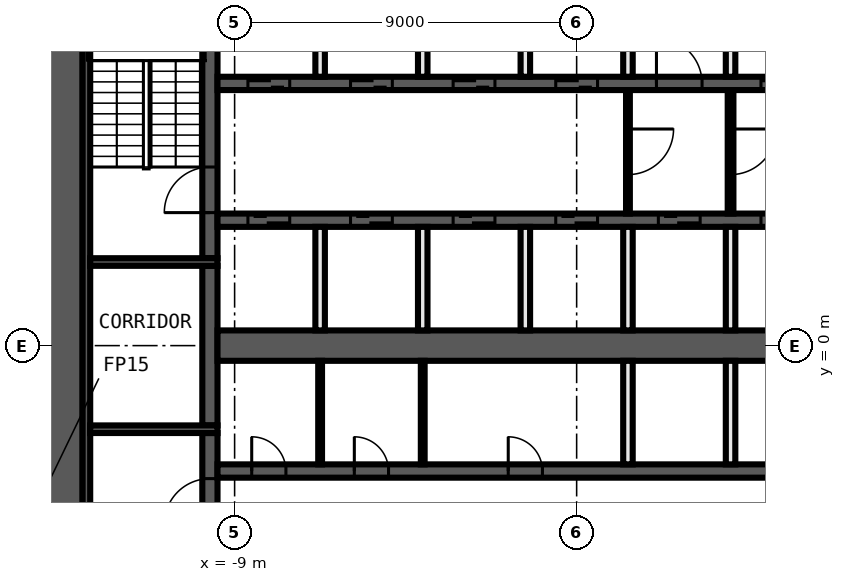
"""IFC4 building model, lengths in metres.
Left out: names, types, materials, properties, quantities, classifications, styles, units other than length and angle.
Written with IfcOpenShell. Run it as: python <this file> out.ifc"""

import sys

from ifc_helpers import new_model, si_unit, direction, frame, frame_2d, origin, place, context, subcontext, project, spatial, rectangle, extrude, element, fill, save


model = new_model("IFC4")
c1 = context("Model", 3, precision=1e-05, world=origin(), true_north=direction((0.0, 1.0)))
c2 = subcontext(c1, "Body", "Model", "MODEL_VIEW")
j1 = project(units=[si_unit("LENGTHUNIT", "METRE"), si_unit("PLANEANGLEUNIT", "RADIAN")], contexts=[c1])
p1 = place(None, origin())
s1 = spatial("IfcSite", under=j1, at=p1, CompositionType="ELEMENT")
p2 = place(p1, origin())
s2 = spatial("IfcBuilding", under=s1, at=p2, CompositionType="ELEMENT")
p3 = place(p2, frame((0.0, 0.0, 95.2)))
s3 = spatial("IfcBuildingStorey", under=s2, at=p3, CompositionType="ELEMENT", Elevation=95.2)
p4 = place(p3, frame((-13.5, -10.0, 0.0), z_axis=(0.0, 0.0, 1.0), x_axis=(0.0, 1.0, 0.0)))
e1 = element("IfcWall", 1, at=p4, inside=s3, PredefinedType="SHEAR", context=c2, shape_type="SweptSolid", body=[
    extrude(rectangle(XDim=20.0, YDim=1.0, at=frame_2d((10.0, 0.0))), origin(), (0.0, 0.0, 1.0), 3.25),
])
p5 = place(p3, frame((-12.9, -9.8, 0.0), z_axis=(0.0, 0.0, 1.0), x_axis=(0.0, 1.0, 0.0)))
e2 = element("IfcWall", 2, at=p5, inside=s3, PredefinedType="SHEAR", context=c2, shape_type="SweptSolid", body=[
    extrude(rectangle(XDim=19.6, YDim=0.2, at=frame_2d((9.8, 0.0))), origin(), (0.0, 0.0, 1.0), 3.25),
])
p6 = place(p3, frame((-9.65, -9.8, 0.0), z_axis=(0.0, 0.0, 1.0), x_axis=(0.0, 1.0, 0.0)))
e3 = element("IfcWall", 3, at=p6, inside=s3, PredefinedType="SHEAR", context=c2, shape_type="SweptSolid", body=[
    extrude(rectangle(XDim=7.5, YDim=0.4, at=frame_2d((3.75, 0.0))), origin(), (0.0, 0.0, 1.0), 3.25),
])
p7 = place(p6, frame((5.1, 0.0, 0.0)))
e4 = element("IfcOpeningElement", 4, at=p7, cuts=e3, PredefinedType="OPENING", context=c2, shape_type="SweptSolid", body=[
    extrude(rectangle(XDim=1.2, YDim=2.1, at=frame_2d((0.6, 1.05))), frame((0.0, 0.21, 0.0), z_axis=(0.0, -1.0, 0.0), x_axis=(1.0, 0.0, 0.0)), (0.0, 0.0, 1.0), 0.42),
])
p8 = place(p3, frame((-9.65, -2.1, 0.0), z_axis=(0.0, 0.0, 1.0), x_axis=(0.0, 1.0, 0.0)))
e5 = element("IfcWall", 5, at=p8, inside=s3, PredefinedType="SHEAR", context=c2, shape_type="SweptSolid", body=[
    extrude(rectangle(XDim=4.2, YDim=0.4, at=frame_2d((2.1, 0.0))), origin(), (0.0, 0.0, 1.0), 3.25),
])
p9 = place(p3, frame((-9.65, 2.3, 0.0), z_axis=(0.0, 0.0, 1.0), x_axis=(0.0, 1.0, 0.0)))
e6 = element("IfcWall", 6, at=p9, inside=s3, PredefinedType="SHEAR", context=c2, shape_type="SweptSolid", body=[
    extrude(rectangle(XDim=7.5, YDim=0.4, at=frame_2d((3.75, 0.0))), origin(), (0.0, 0.0, 1.0), 3.25),
])
p10 = place(p9, frame((1.2, 0.0, 0.0)))
e7 = element("IfcOpeningElement", 7, at=p10, cuts=e6, PredefinedType="OPENING", context=c2, shape_type="SweptSolid", body=[
    extrude(rectangle(XDim=1.2, YDim=2.1, at=frame_2d((0.6, 1.05))), frame((0.0, 0.21, 0.0), z_axis=(0.0, -1.0, 0.0), x_axis=(1.0, 0.0, 0.0)), (0.0, 0.0, 1.0), 0.42),
])
for number, where, z_axis, x_axis in (
    (8, (-9.45, 2.2, 0.0), (0.0, 0.0, 1.0), (-1.0, 0.0, 0.0)),
    (9, (-9.45, -2.2, 0.0), (0.0, 0.0, 1.0), (-1.0, 0.0, 0.0)),
):
    element("IfcWall", number, at=place(p3, frame(where, z_axis=z_axis, x_axis=x_axis)), inside=s3, PredefinedType="SHEAR", context=c2, shape_type="SweptSolid", body=[
        extrude(rectangle(XDim=3.35, YDim=0.2, at=frame_2d((1.675, 0.0))), origin(), (0.0, 0.0, 1.0), 3.25),
    ])
p11 = place(p3, frame((-9.45, 6.9, 0.0), z_axis=(0.0, 0.0, 1.0), x_axis=(1.0, 0.0, 0.0)))
e10 = element("IfcWall", 10, at=p11, inside=s3, PredefinedType="SHEAR", context=c2, shape_type="SweptSolid", body=[
    extrude(rectangle(XDim=18.9, YDim=0.35, at=frame_2d((9.45, 0.0))), origin(), (0.0, 0.0, 1.0), 3.25),
])
p12 = place(p11, frame((0.8, 0.0, 0.0)))
e11 = element("IfcOpeningElement", 11, at=p12, cuts=e10, PredefinedType="OPENING", context=c2, shape_type="SweptSolid", body=[
    extrude(rectangle(XDim=1.1, YDim=2.1, at=frame_2d((0.55, 1.05))), frame((0.0, 0.185, 0.0), z_axis=(0.0, -1.0, 0.0), x_axis=(1.0, 0.0, 0.0)), (0.0, 0.0, 1.0), 0.37),
])
p13 = place(p11, frame((3.5, 0.0, 0.0)))
e12 = element("IfcOpeningElement", 12, at=p13, cuts=e10, PredefinedType="OPENING", context=c2, shape_type="SweptSolid", body=[
    extrude(rectangle(XDim=1.1, YDim=2.1, at=frame_2d((0.55, 1.05))), frame((0.0, 0.185, 0.0), z_axis=(0.0, -1.0, 0.0), x_axis=(1.0, 0.0, 0.0)), (0.0, 0.0, 1.0), 0.37),
])
p14 = place(p11, frame((6.2, 0.0, 0.0)))
e13 = element("IfcOpeningElement", 13, at=p14, cuts=e10, PredefinedType="OPENING", context=c2, shape_type="SweptSolid", body=[
    extrude(rectangle(XDim=1.1, YDim=2.1, at=frame_2d((0.55, 1.05))), frame((0.0, 0.185, 0.0), z_axis=(0.0, -1.0, 0.0), x_axis=(1.0, 0.0, 0.0)), (0.0, 0.0, 1.0), 0.37),
])
p15 = place(p11, frame((8.9, 0.0, 0.0)))
e14 = element("IfcOpeningElement", 14, at=p15, cuts=e10, PredefinedType="OPENING", context=c2, shape_type="SweptSolid", body=[
    extrude(rectangle(XDim=1.1, YDim=2.1, at=frame_2d((0.55, 1.05))), frame((0.0, 0.185, 0.0), z_axis=(0.0, -1.0, 0.0), x_axis=(1.0, 0.0, 0.0)), (0.0, 0.0, 1.0), 0.37),
])
p16 = place(p11, frame((11.55, 0.0, 0.0)))
e15 = element("IfcOpeningElement", 15, at=p16, cuts=e10, PredefinedType="OPENING", context=c2, shape_type="SweptSolid", body=[
    extrude(rectangle(XDim=1.2, YDim=2.1, at=frame_2d((0.6, 1.05))), frame((0.0, 0.185, 0.0), z_axis=(0.0, -1.0, 0.0), x_axis=(1.0, 0.0, 0.0)), (0.0, 0.0, 1.0), 0.37),
])
p17 = place(p11, frame((14.3, 0.0, 0.0)))
e16 = element("IfcOpeningElement", 16, at=p17, cuts=e10, PredefinedType="OPENING", context=c2, shape_type="SweptSolid", body=[
    extrude(rectangle(XDim=1.1, YDim=2.1, at=frame_2d((0.55, 1.05))), frame((0.0, 0.185, 0.0), z_axis=(0.0, -1.0, 0.0), x_axis=(1.0, 0.0, 0.0)), (0.0, 0.0, 1.0), 0.37),
])
p18 = place(p11, frame((17.0, 0.0, 0.0)))
e17 = element("IfcOpeningElement", 17, at=p18, cuts=e10, PredefinedType="OPENING", context=c2, shape_type="SweptSolid", body=[
    extrude(rectangle(XDim=1.1, YDim=2.1, at=frame_2d((0.55, 1.05))), frame((0.0, 0.185, 0.0), z_axis=(0.0, -1.0, 0.0), x_axis=(1.0, 0.0, 0.0)), (0.0, 0.0, 1.0), 0.37),
])
p19 = place(p3, frame((9.45, 3.3, 0.0), z_axis=(0.0, 0.0, 1.0), x_axis=(-1.0, 0.0, 0.0)))
e18 = element("IfcWall", 18, at=p19, inside=s3, PredefinedType="SHEAR", context=c2, shape_type="SweptSolid", body=[
    extrude(rectangle(XDim=18.9, YDim=0.35, at=frame_2d((9.45, 0.0))), origin(), (0.0, 0.0, 1.0), 3.25),
])
p20 = place(p19, frame((17.0, 0.0, 0.0)))
e19 = element("IfcOpeningElement", 19, at=p20, cuts=e18, PredefinedType="OPENING", context=c2, shape_type="SweptSolid", body=[
    extrude(rectangle(XDim=1.1, YDim=2.1, at=frame_2d((0.55, 1.05))), frame((0.0, 0.185, 0.0), z_axis=(0.0, -1.0, 0.0), x_axis=(1.0, 0.0, 0.0)), (0.0, 0.0, 1.0), 0.37),
])
p21 = place(p19, frame((14.3, 0.0, 0.0)))
e20 = element("IfcOpeningElement", 20, at=p21, cuts=e18, PredefinedType="OPENING", context=c2, shape_type="SweptSolid", body=[
    extrude(rectangle(XDim=1.1, YDim=2.1, at=frame_2d((0.55, 1.05))), frame((0.0, 0.185, 0.0), z_axis=(0.0, -1.0, 0.0), x_axis=(1.0, 0.0, 0.0)), (0.0, 0.0, 1.0), 0.37),
])
p22 = place(p19, frame((11.6, 0.0, 0.0)))
e21 = element("IfcOpeningElement", 21, at=p22, cuts=e18, PredefinedType="OPENING", context=c2, shape_type="SweptSolid", body=[
    extrude(rectangle(XDim=1.1, YDim=2.1, at=frame_2d((0.55, 1.05))), frame((0.0, 0.185, 0.0), z_axis=(0.0, -1.0, 0.0), x_axis=(1.0, 0.0, 0.0)), (0.0, 0.0, 1.0), 0.37),
])
p23 = place(p19, frame((8.9, 0.0, 0.0)))
e22 = element("IfcOpeningElement", 22, at=p23, cuts=e18, PredefinedType="OPENING", context=c2, shape_type="SweptSolid", body=[
    extrude(rectangle(XDim=1.1, YDim=2.1, at=frame_2d((0.55, 1.05))), frame((0.0, 0.185, 0.0), z_axis=(0.0, -1.0, 0.0), x_axis=(1.0, 0.0, 0.0)), (0.0, 0.0, 1.0), 0.37),
])
p24 = place(p19, frame((6.2, 0.0, 0.0)))
e23 = element("IfcOpeningElement", 23, at=p24, cuts=e18, PredefinedType="OPENING", context=c2, shape_type="SweptSolid", body=[
    extrude(rectangle(XDim=1.1, YDim=2.1, at=frame_2d((0.55, 1.05))), frame((0.0, 0.185, 0.0), z_axis=(0.0, -1.0, 0.0), x_axis=(1.0, 0.0, 0.0)), (0.0, 0.0, 1.0), 0.37),
])
p25 = place(p19, frame((3.5, 0.0, 0.0)))
e24 = element("IfcOpeningElement", 24, at=p25, cuts=e18, PredefinedType="OPENING", context=c2, shape_type="SweptSolid", body=[
    extrude(rectangle(XDim=1.1, YDim=2.1, at=frame_2d((0.55, 1.05))), frame((0.0, 0.185, 0.0), z_axis=(0.0, -1.0, 0.0), x_axis=(1.0, 0.0, 0.0)), (0.0, 0.0, 1.0), 0.37),
])
p26 = place(p19, frame((0.9, 0.0, 0.0)))
e25 = element("IfcOpeningElement", 25, at=p26, cuts=e18, PredefinedType="OPENING", context=c2, shape_type="SweptSolid", body=[
    extrude(rectangle(XDim=0.9, YDim=2.1, at=frame_2d((0.45, 1.05))), frame((0.0, 0.185, 0.0), z_axis=(0.0, -1.0, 0.0), x_axis=(1.0, 0.0, 0.0)), (0.0, 0.0, 1.0), 0.37),
])
p27 = place(p3, frame((-9.45, -3.3, 0.0), z_axis=(0.0, 0.0, 1.0), x_axis=(1.0, 0.0, 0.0)))
e26 = element("IfcWall", 26, at=p27, inside=s3, PredefinedType="SHEAR", context=c2, shape_type="SweptSolid", body=[
    extrude(rectangle(XDim=18.9, YDim=0.35, at=frame_2d((9.45, 0.0))), origin(), (0.0, 0.0, 1.0), 3.25),
])
p28 = place(p27, frame((17.0, 0.0, 0.0)))
e27 = element("IfcOpeningElement", 27, at=p28, cuts=e26, PredefinedType="OPENING", context=c2, shape_type="SweptSolid", body=[
    extrude(rectangle(XDim=1.1, YDim=2.1, at=frame_2d((0.55, 1.05))), frame((0.0, 0.185, 0.0), z_axis=(0.0, -1.0, 0.0), x_axis=(1.0, 0.0, 0.0)), (0.0, 0.0, 1.0), 0.37),
])
p29 = place(p27, frame((0.9, 0.0, 0.0)))
e28 = element("IfcOpeningElement", 28, at=p29, cuts=e26, PredefinedType="OPENING", context=c2, shape_type="SweptSolid", body=[
    extrude(rectangle(XDim=0.9, YDim=2.1, at=frame_2d((0.45, 1.05))), frame((0.0, 0.185, 0.0), z_axis=(0.0, -1.0, 0.0), x_axis=(1.0, 0.0, 0.0)), (0.0, 0.0, 1.0), 0.37),
])
p30 = place(p27, frame((3.6, 0.0, 0.0)))
e29 = element("IfcOpeningElement", 29, at=p30, cuts=e26, PredefinedType="OPENING", context=c2, shape_type="SweptSolid", body=[
    extrude(rectangle(XDim=0.9, YDim=2.1, at=frame_2d((0.45, 1.05))), frame((0.0, 0.185, 0.0), z_axis=(0.0, -1.0, 0.0), x_axis=(1.0, 0.0, 0.0)), (0.0, 0.0, 1.0), 0.37),
])
p31 = place(p27, frame((7.65, 0.0, 0.0)))
e30 = element("IfcOpeningElement", 30, at=p31, cuts=e26, PredefinedType="OPENING", context=c2, shape_type="SweptSolid", body=[
    extrude(rectangle(XDim=0.9, YDim=2.1, at=frame_2d((0.45, 1.05))), frame((0.0, 0.185, 0.0), z_axis=(0.0, -1.0, 0.0), x_axis=(1.0, 0.0, 0.0)), (0.0, 0.0, 1.0), 0.37),
])
p32 = place(p3, frame((-9.45, 0.0, 0.0), z_axis=(0.0, 0.0, 1.0), x_axis=(1.0, 0.0, 0.0)))
e31 = element("IfcWall", 31, at=p32, inside=s3, PredefinedType="SHEAR", context=c2, shape_type="SweptSolid", body=[
    extrude(rectangle(XDim=18.9, YDim=0.8, at=frame_2d((9.45, 0.0))), origin(), (0.0, 0.0, 1.0), 3.25),
])
p33 = place(p3, frame((4.05, 6.725, 0.0), z_axis=(0.0, 0.0, 1.0), x_axis=(0.0, -1.0, 0.0)))
e32 = element("IfcWall", 32, at=p33, inside=s3, PredefinedType="PARTITIONING", context=c2, shape_type="SweptSolid", body=[
    extrude(rectangle(XDim=3.25, YDim=0.15, at=frame_2d((1.625, 0.0))), origin(), (0.0, 0.0, 1.0), 3.25),
])
p34 = place(p33, frame((1.025, 0.0, 0.0)))
e33 = element("IfcOpeningElement", 33, at=p34, cuts=e32, PredefinedType="OPENING", context=c2, shape_type="SweptSolid", body=[
    extrude(rectangle(XDim=1.2, YDim=2.1, at=frame_2d((0.6, 1.05))), frame((0.0, 0.085, 0.0), z_axis=(0.0, -1.0, 0.0), x_axis=(1.0, 0.0, 0.0)), (0.0, 0.0, 1.0), 0.17),
])
for number, where, z_axis, x_axis in (
    (34, (4.05, -3.125, 0.0), (0.0, 0.0, 1.0), (0.0, 1.0, 0.0)),
    (35, (4.05, 0.4, 0.0), (0.0, 0.0, 1.0), (0.0, 1.0, 0.0)),
    (36, (4.05, 7.075, 0.0), (0.0, 0.0, 1.0), (0.0, 1.0, 0.0)),
):
    element("IfcWall", number, at=place(p3, frame(where, z_axis=z_axis, x_axis=x_axis)), inside=s3, PredefinedType="SOLIDWALL", context=c2, shape_type="SweptSolid", body=[
        extrude(rectangle(XDim=2.725, YDim=0.25, at=frame_2d((1.363, 0.0))), origin(), (0.0, 0.0, 1.0), 3.25),
    ])
p35 = place(p3, frame((1.35, 6.725, 0.0), z_axis=(0.0, 0.0, 1.0), x_axis=(0.0, -1.0, 0.0)))
e37 = element("IfcWall", 37, at=p35, inside=s3, PredefinedType="PARTITIONING", context=c2, shape_type="SweptSolid", body=[
    extrude(rectangle(XDim=3.25, YDim=0.1, at=frame_2d((1.625, 0.0))), origin(), (0.0, 0.0, 1.0), 3.25),
])
p36 = place(p35, frame((1.025, 0.0, 0.0)))
e38 = element("IfcOpeningElement", 38, at=p36, cuts=e37, PredefinedType="OPENING", context=c2, shape_type="SweptSolid", body=[
    extrude(rectangle(XDim=1.2, YDim=2.1, at=frame_2d((0.6, 1.05))), frame((0.0, 0.06, 0.0), z_axis=(0.0, -1.0, 0.0), x_axis=(1.0, 0.0, 0.0)), (0.0, 0.0, 1.0), 0.12),
])
for number, where, z_axis, x_axis in (
    (39, (1.35, -3.125, 0.0), (0.0, 0.0, 1.0), (0.0, 1.0, 0.0)),
    (40, (1.35, 0.4, 0.0), (0.0, 0.0, 1.0), (0.0, 1.0, 0.0)),
    (41, (1.35, 7.075, 0.0), (0.0, 0.0, 1.0), (0.0, 1.0, 0.0)),
    (42, (-1.35, 0.4, 0.0), (0.0, 0.0, 1.0), (0.0, 1.0, 0.0)),
    (43, (-1.35, 7.075, 0.0), (0.0, 0.0, 1.0), (0.0, 1.0, 0.0)),
):
    element("IfcWall", number, at=place(p3, frame(where, z_axis=z_axis, x_axis=x_axis)), inside=s3, PredefinedType="SOLIDWALL", context=c2, shape_type="SweptSolid", body=[
        extrude(rectangle(XDim=2.725, YDim=0.25, at=frame_2d((1.363, 0.0))), origin(), (0.0, 0.0, 1.0), 3.25),
    ])
p37 = place(p3, frame((-4.05, -3.125, 0.0), z_axis=(0.0, 0.0, 1.0), x_axis=(0.0, 1.0, 0.0)))
e44 = element("IfcWall", 44, at=p37, inside=s3, PredefinedType="PARTITIONING", context=c2, shape_type="SweptSolid", body=[
    extrude(rectangle(XDim=2.725, YDim=0.1, at=frame_2d((1.363, 0.0))), origin(), (0.0, 0.0, 1.0), 3.25),
])
for number, where, z_axis, x_axis in (
    (45, (-4.05, 0.4, 0.0), (0.0, 0.0, 1.0), (0.0, 1.0, 0.0)),
    (46, (-4.05, 7.075, 0.0), (0.0, 0.0, 1.0), (0.0, 1.0, 0.0)),
):
    element("IfcWall", number, at=place(p3, frame(where, z_axis=z_axis, x_axis=x_axis)), inside=s3, PredefinedType="SOLIDWALL", context=c2, shape_type="SweptSolid", body=[
        extrude(rectangle(XDim=2.725, YDim=0.25, at=frame_2d((1.363, 0.0))), origin(), (0.0, 0.0, 1.0), 3.25),
    ])
p38 = place(p3, frame((-6.75, -3.125, 0.0), z_axis=(0.0, 0.0, 1.0), x_axis=(0.0, 1.0, 0.0)))
e47 = element("IfcWall", 47, at=p38, inside=s3, PredefinedType="PARTITIONING", context=c2, shape_type="SweptSolid", body=[
    extrude(rectangle(XDim=2.725, YDim=0.1, at=frame_2d((1.363, 0.0))), origin(), (0.0, 0.0, 1.0), 3.25),
])
for number, where, z_axis, x_axis in (
    (48, (-6.75, 0.4, 0.0), (0.0, 0.0, 1.0), (0.0, 1.0, 0.0)),
    (49, (-6.75, 7.075, 0.0), (0.0, 0.0, 1.0), (0.0, 1.0, 0.0)),
):
    element("IfcWall", number, at=place(p3, frame(where, z_axis=z_axis, x_axis=x_axis)), inside=s3, PredefinedType="SOLIDWALL", context=c2, shape_type="SweptSolid", body=[
        extrude(rectangle(XDim=2.725, YDim=0.25, at=frame_2d((1.363, 0.0))), origin(), (0.0, 0.0, 1.0), 3.25),
    ])
p39 = place(p12, origin())
e50 = element("IfcDoor", 50, at=p39, inside=s3, OperationType="DOUBLE_DOOR_SLIDING", PredefinedType="DOOR", context=c2, shape_type="SweptSolid", body=[
    extrude(rectangle(XDim=1.1, YDim=2.1, at=frame_2d((0.55, 1.05))), frame((0.0, 0.025, 0.0), z_axis=(0.0, -1.0, 0.0), x_axis=(1.0, 0.0, 0.0)), (0.0, 0.0, 1.0), 0.05),
])
fill(e11, e50)
p40 = place(p13, origin())
e51 = element("IfcDoor", 51, at=p40, inside=s3, OperationType="DOUBLE_DOOR_SLIDING", PredefinedType="DOOR", context=c2, shape_type="SweptSolid", body=[
    extrude(rectangle(XDim=1.1, YDim=2.1, at=frame_2d((0.55, 1.05))), frame((0.0, 0.025, 0.0), z_axis=(0.0, -1.0, 0.0), x_axis=(1.0, 0.0, 0.0)), (0.0, 0.0, 1.0), 0.05),
])
fill(e12, e51)
p41 = place(p14, origin())
e52 = element("IfcDoor", 52, at=p41, inside=s3, OperationType="DOUBLE_DOOR_SLIDING", PredefinedType="DOOR", context=c2, shape_type="SweptSolid", body=[
    extrude(rectangle(XDim=1.1, YDim=2.1, at=frame_2d((0.55, 1.05))), frame((0.0, 0.025, 0.0), z_axis=(0.0, -1.0, 0.0), x_axis=(1.0, 0.0, 0.0)), (0.0, 0.0, 1.0), 0.05),
])
fill(e13, e52)
p42 = place(p15, origin())
e53 = element("IfcDoor", 53, at=p42, inside=s3, OperationType="DOUBLE_DOOR_SLIDING", PredefinedType="DOOR", context=c2, shape_type="SweptSolid", body=[
    extrude(rectangle(XDim=1.1, YDim=2.1, at=frame_2d((0.55, 1.05))), frame((0.0, 0.025, 0.0), z_axis=(0.0, -1.0, 0.0), x_axis=(1.0, 0.0, 0.0)), (0.0, 0.0, 1.0), 0.05),
])
fill(e14, e53)
p43 = place(p16, origin())
e54 = element("IfcDoor", 54, at=p43, inside=s3, OperationType="SINGLE_SWING_LEFT", PredefinedType="DOOR", context=c2, shape_type="SweptSolid", body=[
    extrude(rectangle(XDim=1.2, YDim=2.1, at=frame_2d((0.6, 1.05))), frame((0.0, 0.025, 0.0), z_axis=(0.0, -1.0, 0.0), x_axis=(1.0, 0.0, 0.0)), (0.0, 0.0, 1.0), 0.05),
])
fill(e15, e54)
p44 = place(p17, origin())
e55 = element("IfcDoor", 55, at=p44, inside=s3, OperationType="DOUBLE_DOOR_SLIDING", PredefinedType="DOOR", context=c2, shape_type="SweptSolid", body=[
    extrude(rectangle(XDim=1.1, YDim=2.1, at=frame_2d((0.55, 1.05))), frame((0.0, 0.025, 0.0), z_axis=(0.0, -1.0, 0.0), x_axis=(1.0, 0.0, 0.0)), (0.0, 0.0, 1.0), 0.05),
])
fill(e16, e55)
p45 = place(p20, origin())
e56 = element("IfcDoor", 56, at=p45, inside=s3, OperationType="DOUBLE_DOOR_SLIDING", PredefinedType="DOOR", context=c2, shape_type="SweptSolid", body=[
    extrude(rectangle(XDim=1.1, YDim=2.1, at=frame_2d((0.55, 1.05))), frame((0.0, 0.025, 0.0), z_axis=(0.0, -1.0, 0.0), x_axis=(1.0, 0.0, 0.0)), (0.0, 0.0, 1.0), 0.05),
])
fill(e19, e56)
p46 = place(p21, origin())
e57 = element("IfcDoor", 57, at=p46, inside=s3, OperationType="DOUBLE_DOOR_SLIDING", PredefinedType="DOOR", context=c2, shape_type="SweptSolid", body=[
    extrude(rectangle(XDim=1.1, YDim=2.1, at=frame_2d((0.55, 1.05))), frame((0.0, 0.025, 0.0), z_axis=(0.0, -1.0, 0.0), x_axis=(1.0, 0.0, 0.0)), (0.0, 0.0, 1.0), 0.05),
])
fill(e20, e57)
p47 = place(p22, origin())
e58 = element("IfcDoor", 58, at=p47, inside=s3, OperationType="DOUBLE_DOOR_SLIDING", PredefinedType="DOOR", context=c2, shape_type="SweptSolid", body=[
    extrude(rectangle(XDim=1.1, YDim=2.1, at=frame_2d((0.55, 1.05))), frame((0.0, 0.025, 0.0), z_axis=(0.0, -1.0, 0.0), x_axis=(1.0, 0.0, 0.0)), (0.0, 0.0, 1.0), 0.05),
])
fill(e21, e58)
p48 = place(p23, origin())
e59 = element("IfcDoor", 59, at=p48, inside=s3, OperationType="DOUBLE_DOOR_SLIDING", PredefinedType="DOOR", context=c2, shape_type="SweptSolid", body=[
    extrude(rectangle(XDim=1.1, YDim=2.1, at=frame_2d((0.55, 1.05))), frame((0.0, 0.025, 0.0), z_axis=(0.0, -1.0, 0.0), x_axis=(1.0, 0.0, 0.0)), (0.0, 0.0, 1.0), 0.05),
])
fill(e22, e59)
p49 = place(p24, origin())
e60 = element("IfcDoor", 60, at=p49, inside=s3, OperationType="DOUBLE_DOOR_SLIDING", PredefinedType="DOOR", context=c2, shape_type="SweptSolid", body=[
    extrude(rectangle(XDim=1.1, YDim=2.1, at=frame_2d((0.55, 1.05))), frame((0.0, 0.025, 0.0), z_axis=(0.0, -1.0, 0.0), x_axis=(1.0, 0.0, 0.0)), (0.0, 0.0, 1.0), 0.05),
])
fill(e23, e60)
p50 = place(p25, origin())
e61 = element("IfcDoor", 61, at=p50, inside=s3, OperationType="DOUBLE_DOOR_SLIDING", PredefinedType="DOOR", context=c2, shape_type="SweptSolid", body=[
    extrude(rectangle(XDim=1.1, YDim=2.1, at=frame_2d((0.55, 1.05))), frame((0.0, 0.025, 0.0), z_axis=(0.0, -1.0, 0.0), x_axis=(1.0, 0.0, 0.0)), (0.0, 0.0, 1.0), 0.05),
])
fill(e24, e61)
p51 = place(p29, origin())
e62 = element("IfcDoor", 62, at=p51, inside=s3, OperationType="SINGLE_SWING_RIGHT", PredefinedType="DOOR", context=c2, shape_type="SweptSolid", body=[
    extrude(rectangle(XDim=0.9, YDim=2.1, at=frame_2d((0.45, 1.05))), frame((0.0, 0.025, 0.0), z_axis=(0.0, -1.0, 0.0), x_axis=(1.0, 0.0, 0.0)), (0.0, 0.0, 1.0), 0.05),
])
fill(e28, e62)
p52 = place(p30, origin())
e63 = element("IfcDoor", 63, at=p52, inside=s3, OperationType="SINGLE_SWING_LEFT", PredefinedType="DOOR", context=c2, shape_type="SweptSolid", body=[
    extrude(rectangle(XDim=0.9, YDim=2.1, at=frame_2d((0.45, 1.05))), frame((0.0, 0.025, 0.0), z_axis=(0.0, -1.0, 0.0), x_axis=(1.0, 0.0, 0.0)), (0.0, 0.0, 1.0), 0.05),
])
fill(e29, e63)
p53 = place(p31, origin())
e64 = element("IfcDoor", 64, at=p53, inside=s3, OperationType="SINGLE_SWING_RIGHT", PredefinedType="DOOR", context=c2, shape_type="SweptSolid", body=[
    extrude(rectangle(XDim=0.9, YDim=2.1, at=frame_2d((0.45, 1.05))), frame((0.0, 0.025, 0.0), z_axis=(0.0, -1.0, 0.0), x_axis=(1.0, 0.0, 0.0)), (0.0, 0.0, 1.0), 0.05),
])
fill(e30, e64)
p54 = place(p10, origin())
e65 = element("IfcDoor", 65, at=p54, inside=s3, OperationType="SINGLE_SWING_RIGHT", PredefinedType="DOOR", context=c2, shape_type="SweptSolid", body=[
    extrude(rectangle(XDim=1.2, YDim=2.1, at=frame_2d((0.6, 1.05))), frame((0.0, 0.025, 0.0), z_axis=(0.0, -1.0, 0.0), x_axis=(1.0, 0.0, 0.0)), (0.0, 0.0, 1.0), 0.05),
])
fill(e7, e65)
p55 = place(p7, origin())
e66 = element("IfcDoor", 66, at=p55, inside=s3, OperationType="SINGLE_SWING_LEFT", PredefinedType="DOOR", context=c2, shape_type="SweptSolid", body=[
    extrude(rectangle(XDim=1.2, YDim=2.1, at=frame_2d((0.6, 1.05))), frame((0.0, 0.025, 0.0), z_axis=(0.0, -1.0, 0.0), x_axis=(1.0, 0.0, 0.0)), (0.0, 0.0, 1.0), 0.05),
])
fill(e4, e66)
p56 = place(p36, origin())
e67 = element("IfcDoor", 67, at=p56, inside=s3, OperationType="SINGLE_SWING_LEFT", PredefinedType="DOOR", context=c2, shape_type="SweptSolid", body=[
    extrude(rectangle(XDim=1.2, YDim=2.1, at=frame_2d((0.6, 1.05))), frame((0.0, 0.025, 0.0), z_axis=(0.0, -1.0, 0.0), x_axis=(1.0, 0.0, 0.0)), (0.0, 0.0, 1.0), 0.05),
])
fill(e38, e67)
p57 = place(p34, origin())
e68 = element("IfcDoor", 68, at=p57, inside=s3, OperationType="SINGLE_SWING_RIGHT", PredefinedType="DOOR", context=c2, shape_type="SweptSolid", body=[
    extrude(rectangle(XDim=1.2, YDim=2.1, at=frame_2d((0.6, 1.05))), frame((0.0, 0.025, 0.0), z_axis=(0.0, -1.0, 0.0), x_axis=(1.0, 0.0, 0.0)), (0.0, 0.0, 1.0), 0.05),
])
fill(e33, e68)
save(model, sys.argv[1])
